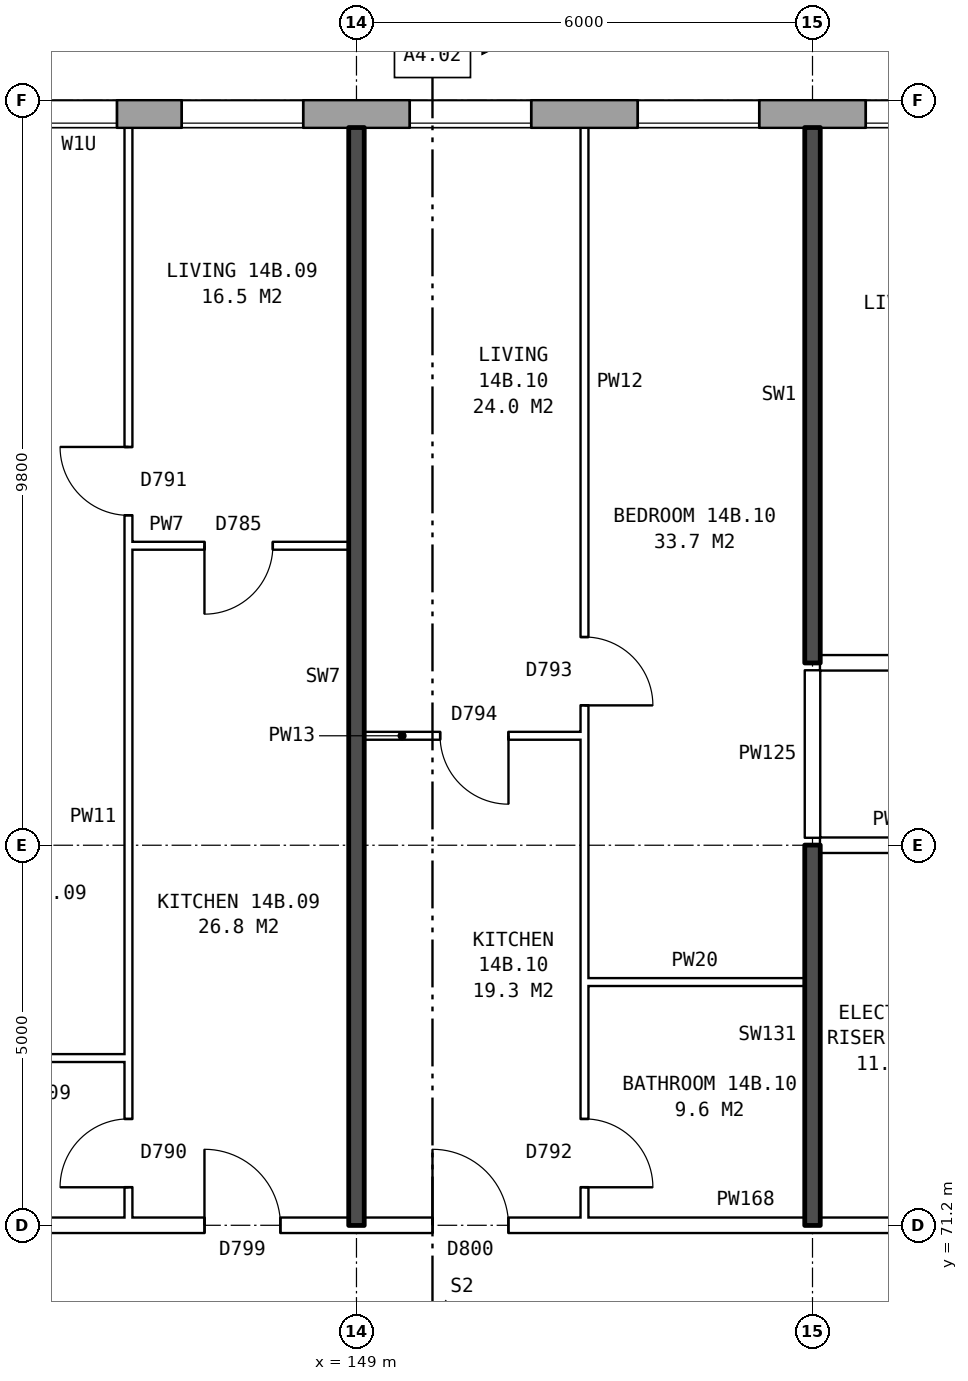
"""IFC4 building model, lengths in metres.
Left out: names, types, materials, properties, quantities, classifications, styles, units other than length and angle.
Written with IfcOpenShell. Run it as: python <this file> out.ifc"""

import sys

from ifc_helpers import new_model, si_unit, direction, frame, frame_2d, origin, place, context, subcontext, project, spatial, rectangle, extrude, element, fill, save


model = new_model("IFC4")
c1 = context("Model", 3, precision=1e-05, world=origin(), true_north=direction((0.0, 1.0)))
c2 = subcontext(c1, "Body", "Model", "MODEL_VIEW")
j1 = project(units=[si_unit("LENGTHUNIT", "METRE"), si_unit("PLANEANGLEUNIT", "RADIAN")], contexts=[c1])
p1 = place(None, origin())
s1 = spatial("IfcSite", under=j1, at=p1, CompositionType="ELEMENT")
p2 = place(p1, origin())
s2 = spatial("IfcBuilding", under=s1, at=p2, CompositionType="ELEMENT")
p3 = place(p2, frame((0.0, 0.0, 53.6)))
s3 = spatial("IfcBuildingStorey", under=s2, at=p3, CompositionType="ELEMENT", Elevation=53.6)
p4 = place(p3, frame((173.425, 85.82, 0.0), z_axis=(0.0, 0.0, 1.0), x_axis=(-1.0, 0.0, 0.0)))
e1 = element("IfcWall", 1, at=p4, inside=s3, PredefinedType="STANDARD", context=c2, shape_type="SweptSolid", body=[
    extrude(rectangle(XDim=39.351, YDim=0.36, at=frame_2d((19.675, 0.0))), origin(), (0.0, 0.0, 1.0), 2.85),
])
p5 = place(p4, frame((1.125, 0.0, 0.8)))
e2 = element("IfcOpeningElement", 2, at=p5, cuts=e1, PredefinedType="OPENING", context=c2, shape_type="SweptSolid", body=[
    extrude(rectangle(XDim=1.6, YDim=1.8, at=frame_2d((0.8, 0.9))), frame((0.0, 0.19, 0.0), z_axis=(0.0, -1.0, 0.0), x_axis=(1.0, 0.0, 0.0)), (0.0, 0.0, 1.0), 0.38),
])
p6 = place(p4, frame((4.125, 0.0, 0.8)))
e3 = element("IfcOpeningElement", 3, at=p6, cuts=e1, PredefinedType="OPENING", context=c2, shape_type="SweptSolid", body=[
    extrude(rectangle(XDim=1.6, YDim=1.8, at=frame_2d((0.8, 0.9))), frame((0.0, 0.19, 0.0), z_axis=(0.0, -1.0, 0.0), x_axis=(1.0, 0.0, 0.0)), (0.0, 0.0, 1.0), 0.38),
])
p7 = place(p4, frame((7.125, 0.0, 0.8)))
e4 = element("IfcOpeningElement", 4, at=p7, cuts=e1, PredefinedType="OPENING", context=c2, shape_type="SweptSolid", body=[
    extrude(rectangle(XDim=1.6, YDim=1.8, at=frame_2d((0.8, 0.9))), frame((0.0, 0.19, 0.0), z_axis=(0.0, -1.0, 0.0), x_axis=(1.0, 0.0, 0.0)), (0.0, 0.0, 1.0), 0.38),
])
p8 = place(p4, frame((9.625, 0.0, 1.65)))
e5 = element("IfcOpeningElement", 5, at=p8, cuts=e1, PredefinedType="OPENING", context=c2, shape_type="SweptSolid", body=[
    extrude(rectangle(XDim=0.6, YDim=0.9, at=frame_2d((0.3, 0.45))), frame((0.0, 0.19, 0.0), z_axis=(0.0, -1.0, 0.0), x_axis=(1.0, 0.0, 0.0)), (0.0, 0.0, 1.0), 0.38),
])
p9 = place(p4, frame((13.125, 0.0, 0.8)))
e6 = element("IfcOpeningElement", 6, at=p9, cuts=e1, PredefinedType="OPENING", context=c2, shape_type="SweptSolid", body=[
    extrude(rectangle(XDim=1.6, YDim=1.8, at=frame_2d((0.8, 0.9))), frame((0.0, 0.19, 0.0), z_axis=(0.0, -1.0, 0.0), x_axis=(1.0, 0.0, 0.0)), (0.0, 0.0, 1.0), 0.38),
])
p10 = place(p4, frame((16.125, 0.0, 0.8)))
e7 = element("IfcOpeningElement", 7, at=p10, cuts=e1, PredefinedType="OPENING", context=c2, shape_type="SweptSolid", body=[
    extrude(rectangle(XDim=1.6, YDim=1.8, at=frame_2d((0.8, 0.9))), frame((0.0, 0.19, 0.0), z_axis=(0.0, -1.0, 0.0), x_axis=(1.0, 0.0, 0.0)), (0.0, 0.0, 1.0), 0.38),
])
p11 = place(p4, frame((19.125, 0.0, 0.8)))
e8 = element("IfcOpeningElement", 8, at=p11, cuts=e1, PredefinedType="OPENING", context=c2, shape_type="SweptSolid", body=[
    extrude(rectangle(XDim=1.6, YDim=1.8, at=frame_2d((0.8, 0.9))), frame((0.0, 0.19, 0.0), z_axis=(0.0, -1.0, 0.0), x_axis=(1.0, 0.0, 0.0)), (0.0, 0.0, 1.0), 0.38),
])
p12 = place(p4, frame((22.125, 0.0, 0.8)))
e9 = element("IfcOpeningElement", 9, at=p12, cuts=e1, PredefinedType="OPENING", context=c2, shape_type="SweptSolid", body=[
    extrude(rectangle(XDim=1.6, YDim=1.8, at=frame_2d((0.8, 0.9))), frame((0.0, 0.19, 0.0), z_axis=(0.0, -1.0, 0.0), x_axis=(1.0, 0.0, 0.0)), (0.0, 0.0, 1.0), 0.38),
])
p13 = place(p4, frame((25.125, 0.0, 0.8)))
e10 = element("IfcOpeningElement", 10, at=p13, cuts=e1, PredefinedType="OPENING", context=c2, shape_type="SweptSolid", body=[
    extrude(rectangle(XDim=1.6, YDim=1.8, at=frame_2d((0.8, 0.9))), frame((0.0, 0.19, 0.0), z_axis=(0.0, -1.0, 0.0), x_axis=(1.0, 0.0, 0.0)), (0.0, 0.0, 1.0), 0.38),
])
p14 = place(p4, frame((27.575, 0.0, 0.15)))
e11 = element("IfcOpeningElement", 11, at=p14, cuts=e1, PredefinedType="OPENING", context=c2, shape_type="SweptSolid", body=[
    extrude(rectangle(XDim=1.0, YDim=0.9, at=frame_2d((0.5, 0.45))), frame((0.0, 0.19, 0.0), z_axis=(0.0, -1.0, 0.0), x_axis=(1.0, 0.0, 0.0)), (0.0, 0.0, 1.0), 0.38),
])
p15 = place(p4, frame((31.125, 0.0, 0.8)))
e12 = element("IfcOpeningElement", 12, at=p15, cuts=e1, PredefinedType="OPENING", context=c2, shape_type="SweptSolid", body=[
    extrude(rectangle(XDim=1.6, YDim=1.8, at=frame_2d((0.8, 0.9))), frame((0.0, 0.19, 0.0), z_axis=(0.0, -1.0, 0.0), x_axis=(1.0, 0.0, 0.0)), (0.0, 0.0, 1.0), 0.38),
])
p16 = place(p4, frame((34.125, 0.0, 0.8)))
e13 = element("IfcOpeningElement", 13, at=p16, cuts=e1, PredefinedType="OPENING", context=c2, shape_type="SweptSolid", body=[
    extrude(rectangle(XDim=1.6, YDim=1.8, at=frame_2d((0.8, 0.9))), frame((0.0, 0.19, 0.0), z_axis=(0.0, -1.0, 0.0), x_axis=(1.0, 0.0, 0.0)), (0.0, 0.0, 1.0), 0.38),
])
p17 = place(p4, frame((37.125, 0.0, 0.8)))
e14 = element("IfcOpeningElement", 14, at=p17, cuts=e1, PredefinedType="OPENING", context=c2, shape_type="SweptSolid", body=[
    extrude(rectangle(XDim=1.6, YDim=1.8, at=frame_2d((0.8, 0.9))), frame((0.0, 0.19, 0.0), z_axis=(0.0, -1.0, 0.0), x_axis=(1.0, 0.0, 0.0)), (0.0, 0.0, 1.0), 0.38),
])
p18 = place(p4, frame((10.975, 0.0, 0.35)))
e15 = element("IfcOpeningElement", 15, at=p18, cuts=e1, PredefinedType="OPENING", context=c2, shape_type="SweptSolid", body=[
    extrude(rectangle(XDim=1.2, YDim=0.9, at=frame_2d((0.6, 0.45))), frame((0.0, 0.19, 0.0), z_axis=(0.0, -1.0, 0.0), x_axis=(1.0, 0.0, 0.0)), (0.0, 0.0, 1.0), 0.38),
])
p19 = place(p4, frame((29.125, 0.0, 1.65)))
e16 = element("IfcOpeningElement", 16, at=p19, cuts=e1, PredefinedType="OPENING", context=c2, shape_type="SweptSolid", body=[
    extrude(rectangle(XDim=1.0, YDim=0.9, at=frame_2d((0.5, 0.45))), frame((0.0, 0.19, 0.0), z_axis=(0.0, -1.0, 0.0), x_axis=(1.0, 0.0, 0.0)), (0.0, 0.0, 1.0), 0.38),
])
p20 = place(p3, frame((142.76, 71.2, 0.0), z_axis=(0.0, 0.0, 1.0), x_axis=(1.0, 0.0, 0.0)))
e17 = element("IfcWall", 17, at=p20, inside=s3, PredefinedType="PARTITIONING", context=c2, shape_type="SweptSolid", body=[
    extrude(rectangle(XDim=14.48, YDim=0.2, at=frame_2d((7.24, 0.0))), origin(), (0.0, 0.0, 1.0), 2.85),
])
p21 = place(p20, frame((4.24, 0.0, 0.0)))
e18 = element("IfcOpeningElement", 18, at=p21, cuts=e17, PredefinedType="OPENING", context=c2, shape_type="SweptSolid", body=[
    extrude(rectangle(XDim=1.0, YDim=2.1, at=frame_2d((0.5, 1.05))), frame((0.0, 0.11, 0.0), z_axis=(0.0, -1.0, 0.0), x_axis=(1.0, 0.0, 0.0)), (0.0, 0.0, 1.0), 0.22),
])
p22 = place(p20, frame((7.24, 0.0, 0.0)))
e19 = element("IfcOpeningElement", 19, at=p22, cuts=e17, PredefinedType="OPENING", context=c2, shape_type="SweptSolid", body=[
    extrude(rectangle(XDim=1.0, YDim=2.1, at=frame_2d((0.5, 1.05))), frame((0.0, 0.11, 0.0), z_axis=(0.0, -1.0, 0.0), x_axis=(1.0, 0.0, 0.0)), (0.0, 0.0, 1.0), 0.22),
])
p23 = place(p3, frame((142.76, 73.4, 0.0), z_axis=(0.0, 0.0, 1.0), x_axis=(1.0, 0.0, 0.0)))
e20 = element("IfcWall", 20, at=p23, inside=s3, PredefinedType="PARTITIONING", context=c2, shape_type="SweptSolid", body=[
    extrude(rectangle(XDim=3.24, YDim=0.1, at=frame_2d((1.62, 0.0))), origin(), (0.0, 0.0, 1.0), 2.85),
])
p24 = place(p3, frame((152.0, 74.4, 0.0), z_axis=(0.0, 0.0, 1.0), x_axis=(1.0, 0.0, 0.0)))
e21 = element("IfcWall", 21, at=p24, inside=s3, PredefinedType="PARTITIONING", context=c2, shape_type="SweptSolid", body=[
    extrude(rectangle(XDim=2.9, YDim=0.1, at=frame_2d((1.45, 0.0))), origin(), (0.0, 0.0, 1.0), 2.85),
])
p25 = place(p3, frame((155.1, 76.2, 0.0), z_axis=(0.0, 0.0, 1.0), x_axis=(1.0, 0.0, 0.0)))
e22 = element("IfcWall", 22, at=p25, inside=s3, PredefinedType="PARTITIONING", context=c2, shape_type="SweptSolid", body=[
    extrude(rectangle(XDim=2.14, YDim=0.2, at=frame_2d((1.07, 0.0))), origin(), (0.0, 0.0, 1.0), 2.85),
])
p26 = place(p3, frame((149.1, 77.64, 0.0), z_axis=(0.0, 0.0, 1.0), x_axis=(1.0, 0.0, 0.0)))
e23 = element("IfcWall", 23, at=p26, inside=s3, PredefinedType="PARTITIONING", context=c2, shape_type="SweptSolid", body=[
    extrude(rectangle(XDim=2.9, YDim=0.1, at=frame_2d((1.45, 0.0))), origin(), (0.0, 0.0, 1.0), 2.85),
])
p27 = place(p26, frame((1.0, 0.0, 0.0)))
e24 = element("IfcOpeningElement", 24, at=p27, cuts=e23, PredefinedType="OPENING", context=c2, shape_type="SweptSolid", body=[
    extrude(rectangle(XDim=0.9, YDim=2.1, at=frame_2d((0.45, 1.05))), frame((0.0, 0.06, 0.0), z_axis=(0.0, -1.0, 0.0), x_axis=(1.0, 0.0, 0.0)), (0.0, 0.0, 1.0), 0.12),
])
p28 = place(p3, frame((155.1, 78.6, 0.0), z_axis=(0.0, 0.0, 1.0), x_axis=(1.0, 0.0, 0.0)))
e25 = element("IfcWall", 25, at=p28, inside=s3, PredefinedType="PARTITIONING", context=c2, shape_type="SweptSolid", body=[
    extrude(rectangle(XDim=21.04, YDim=0.2, at=frame_2d((10.52, 0.0))), origin(), (0.0, 0.0, 1.0), 2.85),
])
p29 = place(p28, frame((2.45, 0.0, 0.0)))
e26 = element("IfcOpeningElement", 26, at=p29, cuts=e25, PredefinedType="OPENING", context=c2, shape_type="SweptSolid", body=[
    extrude(rectangle(XDim=1.0, YDim=2.1, at=frame_2d((0.5, 1.05))), frame((0.0, 0.11, 0.0), z_axis=(0.0, -1.0, 0.0), x_axis=(1.0, 0.0, 0.0)), (0.0, 0.0, 1.0), 0.22),
])
p30 = place(p28, frame((14.4, 0.0, 0.0)))
e27 = element("IfcOpeningElement", 27, at=p30, cuts=e25, PredefinedType="OPENING", context=c2, shape_type="SweptSolid", body=[
    extrude(rectangle(XDim=1.0, YDim=2.1, at=frame_2d((0.5, 1.05))), frame((0.0, 0.11, 0.0), z_axis=(0.0, -1.0, 0.0), x_axis=(1.0, 0.0, 0.0)), (0.0, 0.0, 1.0), 0.22),
])
p31 = place(p3, frame((146.0, 80.14, 0.0), z_axis=(0.0, 0.0, 1.0), x_axis=(1.0, 0.0, 0.0)))
e28 = element("IfcWall", 28, at=p31, inside=s3, PredefinedType="PARTITIONING", context=c2, shape_type="SweptSolid", body=[
    extrude(rectangle(XDim=2.9, YDim=0.1, at=frame_2d((1.45, 0.0))), origin(), (0.0, 0.0, 1.0), 2.85),
])
p32 = place(p31, frame((1.0, 0.0, 0.0)))
e29 = element("IfcOpeningElement", 29, at=p32, cuts=e28, PredefinedType="OPENING", context=c2, shape_type="SweptSolid", body=[
    extrude(rectangle(XDim=0.9, YDim=2.1, at=frame_2d((0.45, 1.05))), frame((0.0, 0.06, 0.0), z_axis=(0.0, -1.0, 0.0), x_axis=(1.0, 0.0, 0.0)), (0.0, 0.0, 1.0), 0.12),
])
p33 = place(p3, frame((146.0, 71.3, 0.0), z_axis=(0.0, 0.0, 1.0), x_axis=(0.0, 1.0, 0.0)))
e30 = element("IfcWall", 30, at=p33, inside=s3, PredefinedType="PARTITIONING", context=c2, shape_type="SweptSolid", body=[
    extrude(rectangle(XDim=14.34, YDim=0.1, at=frame_2d((7.17, 0.0))), origin(), (0.0, 0.0, 1.0), 2.85),
])
p34 = place(p33, frame((9.24, 0.0, 0.0)))
e31 = element("IfcOpeningElement", 31, at=p34, cuts=e30, PredefinedType="OPENING", context=c2, shape_type="SweptSolid", body=[
    extrude(rectangle(XDim=0.9, YDim=2.1, at=frame_2d((0.45, 1.05))), frame((0.0, 0.06, 0.0), z_axis=(0.0, -1.0, 0.0), x_axis=(1.0, 0.0, 0.0)), (0.0, 0.0, 1.0), 0.12),
])
p35 = place(p33, frame((0.4, 0.0, 0.0)))
e32 = element("IfcOpeningElement", 32, at=p35, cuts=e30, PredefinedType="OPENING", context=c2, shape_type="SweptSolid", body=[
    extrude(rectangle(XDim=0.9, YDim=2.1, at=frame_2d((0.45, 1.05))), frame((0.0, 0.06, 0.0), z_axis=(0.0, -1.0, 0.0), x_axis=(1.0, 0.0, 0.0)), (0.0, 0.0, 1.0), 0.12),
])
p36 = place(p3, frame((149.0, 71.2, 0.0), z_axis=(0.0, 0.0, 1.0), x_axis=(0.0, 1.0, 0.0)))
e33 = element("IfcWall", 33, at=p36, inside=s3, PredefinedType="SOLIDWALL", context=c2, shape_type="SweptSolid", body=[
    extrude(rectangle(XDim=14.44, YDim=0.2, at=frame_2d((7.22, 0.0))), origin(), (0.0, 0.0, 1.0), 2.85),
])
p37 = place(p3, frame((152.0, 71.3, 0.0), z_axis=(0.0, 0.0, 1.0), x_axis=(0.0, 1.0, 0.0)))
e34 = element("IfcWall", 34, at=p37, inside=s3, PredefinedType="PARTITIONING", context=c2, shape_type="SweptSolid", body=[
    extrude(rectangle(XDim=14.34, YDim=0.1, at=frame_2d((7.17, 0.0))), origin(), (0.0, 0.0, 1.0), 2.85),
])
p38 = place(p37, frame((6.74, 0.0, 0.0)))
e35 = element("IfcOpeningElement", 35, at=p38, cuts=e34, PredefinedType="OPENING", context=c2, shape_type="SweptSolid", body=[
    extrude(rectangle(XDim=0.9, YDim=2.1, at=frame_2d((0.45, 1.05))), frame((0.0, 0.06, 0.0), z_axis=(0.0, -1.0, 0.0), x_axis=(1.0, 0.0, 0.0)), (0.0, 0.0, 1.0), 0.12),
])
p39 = place(p37, frame((0.4, 0.0, 0.0)))
e36 = element("IfcOpeningElement", 36, at=p39, cuts=e34, PredefinedType="OPENING", context=c2, shape_type="SweptSolid", body=[
    extrude(rectangle(XDim=0.9, YDim=2.1, at=frame_2d((0.45, 1.05))), frame((0.0, 0.06, 0.0), z_axis=(0.0, -1.0, 0.0), x_axis=(1.0, 0.0, 0.0)), (0.0, 0.0, 1.0), 0.12),
])
p40 = place(p3, frame((155.0, 71.2, 0.0), z_axis=(0.0, 0.0, 1.0), x_axis=(0.0, 1.0, 0.0)))
e37 = element("IfcWall", 37, at=p40, inside=s3, PredefinedType="SOLIDWALL", context=c2, shape_type="SweptSolid", body=[
    extrude(rectangle(XDim=5.0, YDim=0.2, at=frame_2d((2.5, 0.0))), origin(), (0.0, 0.0, 1.0), 2.85),
])
p41 = place(p3, frame((155.0, 76.3, 0.0), z_axis=(0.0, 0.0, 1.0), x_axis=(0.0, 1.0, 0.0)))
e38 = element("IfcWall", 38, at=p41, inside=s3, PredefinedType="PARTITIONING", context=c2, shape_type="SweptSolid", body=[
    extrude(rectangle(XDim=2.2, YDim=0.2, at=frame_2d((1.1, 0.0))), origin(), (0.0, 0.0, 1.0), 2.85),
])
p42 = place(p3, frame((155.0, 78.6, 0.0), z_axis=(0.0, 0.0, 1.0), x_axis=(0.0, 1.0, 0.0)))
e39 = element("IfcWall", 39, at=p42, inside=s3, PredefinedType="SOLIDWALL", context=c2, shape_type="SweptSolid", body=[
    extrude(rectangle(XDim=7.04, YDim=0.2, at=frame_2d((3.52, 0.0))), origin(), (0.0, 0.0, 1.0), 2.85),
])
p43 = place(p10, origin())
e40 = element("IfcWindow", 40, at=p43, inside=s3, PartitioningType="SINGLE_PANEL", PredefinedType="WINDOW", context=c2, shape_type="SweptSolid", body=[
    extrude(rectangle(XDim=1.6, YDim=1.8, at=frame_2d((0.8, 0.9))), frame((0.0, 0.15, 0.0), z_axis=(0.0, -1.0, 0.0), x_axis=(1.0, 0.0, 0.0)), (0.0, 0.0, 1.0), 0.06),
])
fill(e7, e40)
p44 = place(p11, origin())
e41 = element("IfcWindow", 41, at=p44, inside=s3, PartitioningType="SINGLE_PANEL", PredefinedType="WINDOW", context=c2, shape_type="SweptSolid", body=[
    extrude(rectangle(XDim=1.6, YDim=1.8, at=frame_2d((0.8, 0.9))), frame((0.0, 0.15, 0.0), z_axis=(0.0, -1.0, 0.0), x_axis=(1.0, 0.0, 0.0)), (0.0, 0.0, 1.0), 0.06),
])
fill(e8, e41)
p45 = place(p12, origin())
e42 = element("IfcWindow", 42, at=p45, inside=s3, PartitioningType="SINGLE_PANEL", PredefinedType="WINDOW", context=c2, shape_type="SweptSolid", body=[
    extrude(rectangle(XDim=1.6, YDim=1.8, at=frame_2d((0.8, 0.9))), frame((0.0, 0.15, 0.0), z_axis=(0.0, -1.0, 0.0), x_axis=(1.0, 0.0, 0.0)), (0.0, 0.0, 1.0), 0.06),
])
fill(e9, e42)
p46 = place(p13, origin())
e43 = element("IfcWindow", 43, at=p46, inside=s3, PartitioningType="SINGLE_PANEL", PredefinedType="WINDOW", context=c2, shape_type="SweptSolid", body=[
    extrude(rectangle(XDim=1.6, YDim=1.8, at=frame_2d((0.8, 0.9))), frame((0.0, 0.15, 0.0), z_axis=(0.0, -1.0, 0.0), x_axis=(1.0, 0.0, 0.0)), (0.0, 0.0, 1.0), 0.06),
])
fill(e10, e43)
p47 = place(p14, origin())
e44 = element("IfcWindow", 44, at=p47, inside=s3, PartitioningType="SINGLE_PANEL", PredefinedType="WINDOW", context=c2, shape_type="SweptSolid", body=[
    extrude(rectangle(XDim=1.0, YDim=0.9, at=frame_2d((0.5, 0.45))), frame((0.0, 0.15, 0.0), z_axis=(0.0, -1.0, 0.0), x_axis=(1.0, 0.0, 0.0)), (0.0, 0.0, 1.0), 0.06),
])
fill(e11, e44)
p48 = place(p34, origin())
e45 = element("IfcDoor", 45, at=p48, inside=s3, OperationType="SINGLE_SWING_RIGHT", PredefinedType="DOOR", context=c2, shape_type="SweptSolid", body=[
    extrude(rectangle(XDim=0.9, YDim=2.1, at=frame_2d((0.45, 1.05))), frame((0.0, 0.025, 0.0), z_axis=(0.0, -1.0, 0.0), x_axis=(1.0, 0.0, 0.0)), (0.0, 0.0, 1.0), 0.05),
])
fill(e31, e45)
p49 = place(p21, origin())
e46 = element("IfcDoor", 46, at=p49, inside=s3, OperationType="SINGLE_SWING_LEFT", PredefinedType="DOOR", context=c2, shape_type="SweptSolid", body=[
    extrude(rectangle(XDim=1.0, YDim=2.1, at=frame_2d((0.5, 1.05))), frame((0.0, 0.025, 0.0), z_axis=(0.0, -1.0, 0.0), x_axis=(1.0, 0.0, 0.0)), (0.0, 0.0, 1.0), 0.05),
])
fill(e18, e46)
p50 = place(p32, frame((0.9, 0.0, 0.0), z_axis=(0.0, 0.0, 1.0), x_axis=(-1.0, 0.0, 0.0)))
e47 = element("IfcDoor", 47, at=p50, inside=s3, OperationType="SINGLE_SWING_RIGHT", PredefinedType="DOOR", context=c2, shape_type="SweptSolid", body=[
    extrude(rectangle(XDim=0.9, YDim=2.1, at=frame_2d((0.45, 1.05))), frame((0.0, 0.025, 0.0), z_axis=(0.0, -1.0, 0.0), x_axis=(1.0, 0.0, 0.0)), (0.0, 0.0, 1.0), 0.05),
])
fill(e29, e47)
p51 = place(p35, origin())
e48 = element("IfcDoor", 48, at=p51, inside=s3, OperationType="SINGLE_SWING_LEFT", PredefinedType="DOOR", context=c2, shape_type="SweptSolid", body=[
    extrude(rectangle(XDim=0.9, YDim=2.1, at=frame_2d((0.45, 1.05))), frame((0.0, 0.025, 0.0), z_axis=(0.0, -1.0, 0.0), x_axis=(1.0, 0.0, 0.0)), (0.0, 0.0, 1.0), 0.05),
])
fill(e32, e48)
p52 = place(p38, frame((0.9, 0.0, 0.0), z_axis=(0.0, 0.0, 1.0), x_axis=(-1.0, 0.0, 0.0)))
e49 = element("IfcDoor", 49, at=p52, inside=s3, OperationType="SINGLE_SWING_RIGHT", PredefinedType="DOOR", context=c2, shape_type="SweptSolid", body=[
    extrude(rectangle(XDim=0.9, YDim=2.1, at=frame_2d((0.45, 1.05))), frame((0.0, 0.025, 0.0), z_axis=(0.0, -1.0, 0.0), x_axis=(1.0, 0.0, 0.0)), (0.0, 0.0, 1.0), 0.05),
])
fill(e35, e49)
p53 = place(p22, origin())
e50 = element("IfcDoor", 50, at=p53, inside=s3, OperationType="SINGLE_SWING_LEFT", PredefinedType="DOOR", context=c2, shape_type="SweptSolid", body=[
    extrude(rectangle(XDim=1.0, YDim=2.1, at=frame_2d((0.5, 1.05))), frame((0.0, 0.025, 0.0), z_axis=(0.0, -1.0, 0.0), x_axis=(1.0, 0.0, 0.0)), (0.0, 0.0, 1.0), 0.05),
])
fill(e19, e50)
p54 = place(p27, frame((0.9, 0.0, 0.0), z_axis=(0.0, 0.0, 1.0), x_axis=(-1.0, 0.0, 0.0)))
e51 = element("IfcDoor", 51, at=p54, inside=s3, OperationType="SINGLE_SWING_LEFT", PredefinedType="DOOR", context=c2, shape_type="SweptSolid", body=[
    extrude(rectangle(XDim=0.9, YDim=2.1, at=frame_2d((0.45, 1.05))), frame((0.0, 0.025, 0.0), z_axis=(0.0, -1.0, 0.0), x_axis=(1.0, 0.0, 0.0)), (0.0, 0.0, 1.0), 0.05),
])
fill(e24, e51)
p55 = place(p39, frame((0.9, 0.0, 0.0), z_axis=(0.0, 0.0, 1.0), x_axis=(-1.0, 0.0, 0.0)))
e52 = element("IfcDoor", 52, at=p55, inside=s3, OperationType="SINGLE_SWING_RIGHT", PredefinedType="DOOR", context=c2, shape_type="SweptSolid", body=[
    extrude(rectangle(XDim=0.9, YDim=2.1, at=frame_2d((0.45, 1.05))), frame((0.0, 0.025, 0.0), z_axis=(0.0, -1.0, 0.0), x_axis=(1.0, 0.0, 0.0)), (0.0, 0.0, 1.0), 0.05),
])
fill(e36, e52)
save(model, sys.argv[1])
